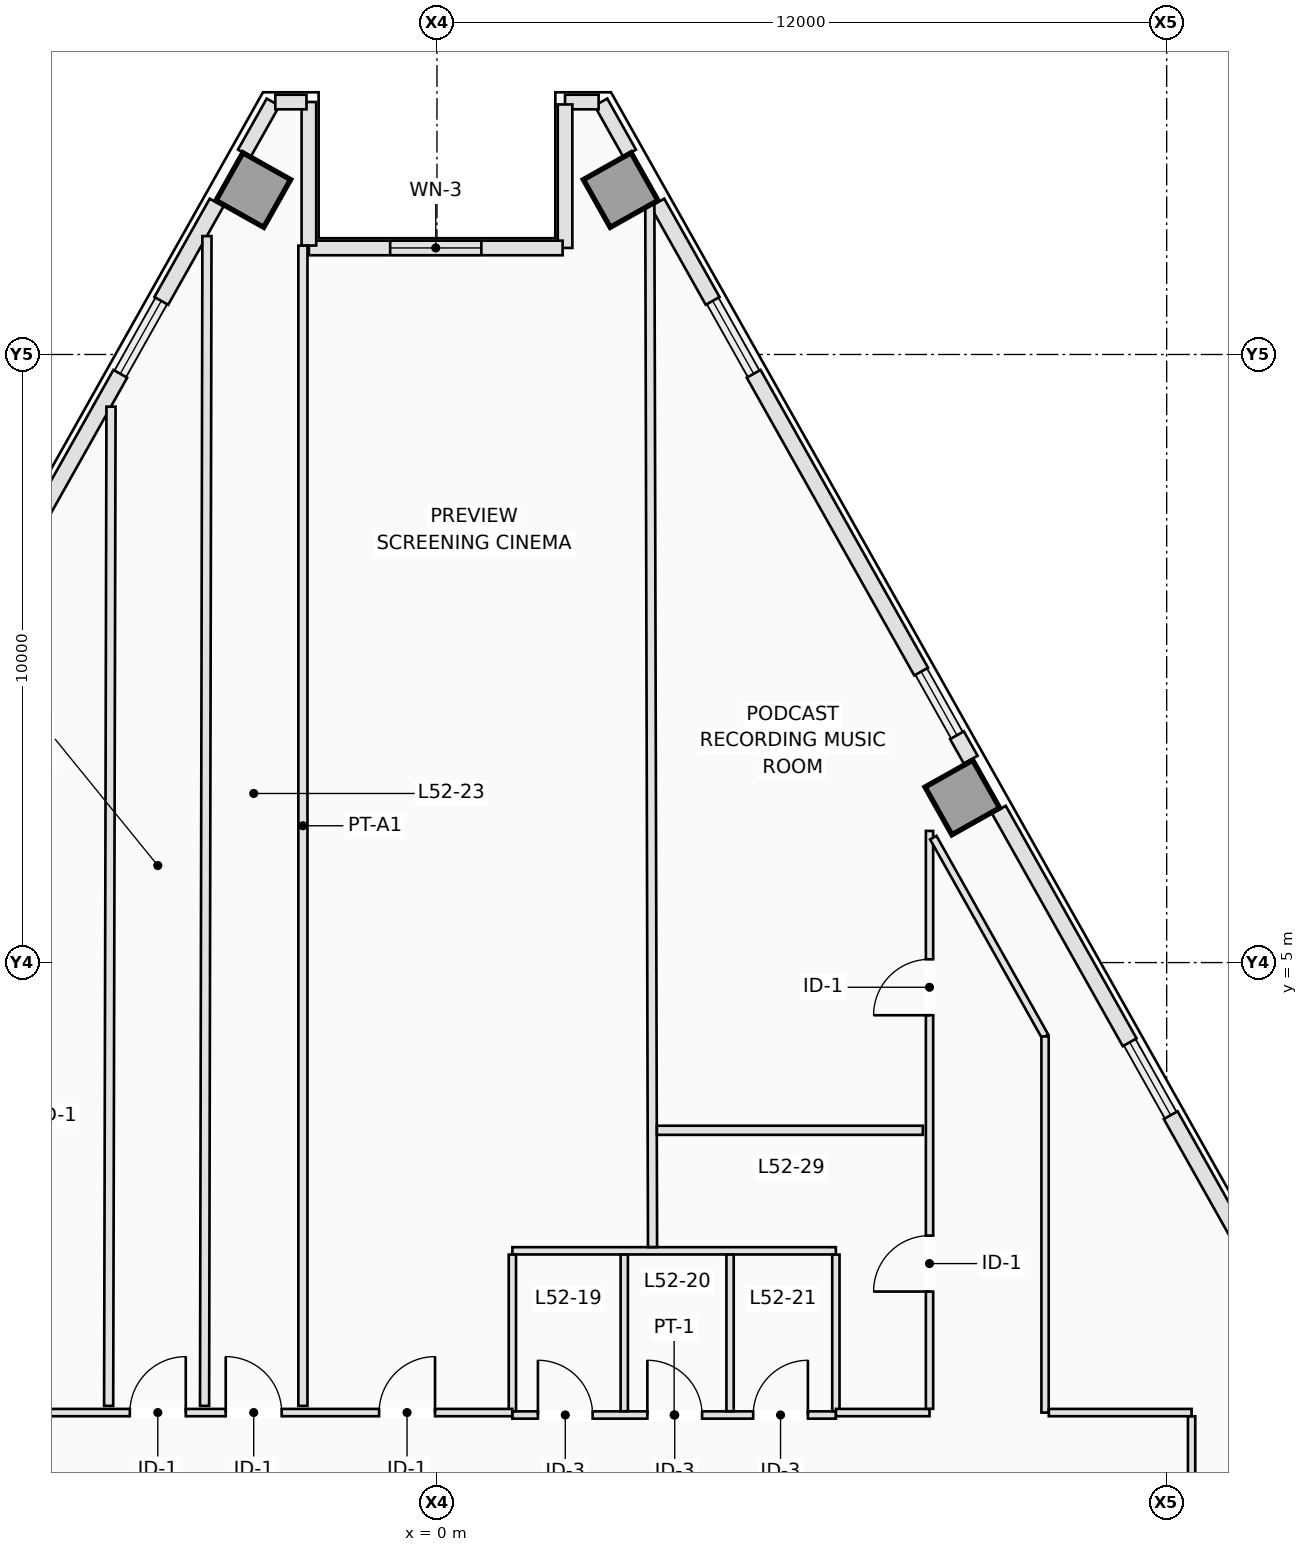
"""IFC4 building model, lengths in metres.
Left out: names, types, materials, properties, quantities, classifications, styles, units other than length and angle.
Written with IfcOpenShell. Run it as: python <this file> out.ifc"""

import sys

from ifc_helpers import new_model, si_unit, direction, frame, frame_2d, origin, origin_2d, place, context, subcontext, project, spatial, rectangle, extrude, element, fill, save


model = new_model("IFC4")
c1 = context("Model", 3, precision=1e-05, world=origin(), true_north=direction((0.0, 1.0)))
c2 = subcontext(c1, "Body", "Model", "MODEL_VIEW")
j1 = project(units=[si_unit("LENGTHUNIT", "METRE"), si_unit("PLANEANGLEUNIT", "RADIAN")], contexts=[c1])
p1 = place(None, origin())
s1 = spatial("IfcSite", under=j1, at=p1, CompositionType="ELEMENT")
p2 = place(p1, origin())
s2 = spatial("IfcBuilding", under=s1, at=p2, CompositionType="ELEMENT")
p3 = place(p2, frame((0.0, 0.0, 190.4)))
s3 = spatial("IfcBuildingStorey", under=s2, at=p3, CompositionType="ELEMENT", Elevation=190.4)
for number, where, z_axis, x_axis in (
    (1, (8.64, 7.715, 0.0), (0.0, 0.0, 1.0), (0.872, 0.49, 0.0)),
    (2, (3.021, 17.704, 0.0), (0.0, 0.0, 1.0), (0.872, 0.49, 0.0)),
    (3, (-3.021, 17.704, 0.0), (0.0, 0.0, 1.0), (-0.872, 0.49, 0.0)),
):
    element("IfcColumn", number, at=place(p3, frame(where, z_axis=z_axis, x_axis=x_axis)), inside=s3, PredefinedType="COLUMN", context=c2, shape_type="SweptSolid", body=[
        extrude(rectangle(XDim=0.9, YDim=0.9, at=origin_2d()), origin(), (0.0, 0.0, 1.0), 3.5),
    ])
p4 = place(p3, frame((2.695, 19.149, 0.0), z_axis=(0.0, 0.0, 1.0), x_axis=(0.490345412687, -0.87152818443, 0.0)))
e4 = element("IfcWall", 4, at=p4, inside=s3, PredefinedType="STANDARD", context=c2, shape_type="SweptSolid", body=[
    extrude(rectangle(XDim=0.964, YDim=0.24, at=frame_2d((0.482, 0.0))), origin(), (0.0, 0.0, 1.0), 3.25),
])
p5 = place(p3, frame((3.624, 17.499, 0.0), z_axis=(0.0, 0.0, 1.0), x_axis=(0.490261239633, -0.871575537125, 0.0)))
e5 = element("IfcWall", 5, at=p5, inside=s3, PredefinedType="STANDARD", context=c2, shape_type="SweptSolid", body=[
    extrude(rectangle(XDim=1.855, YDim=0.26, at=frame_2d((0.928, 0.0))), origin(), (0.0, 0.0, 1.0), 3.25),
])
p6 = place(p3, frame((5.208, 14.682, 0.0), z_axis=(0.0, 0.0, 1.0), x_axis=(0.490240608828, -0.871587141631, 0.0)))
e6 = element("IfcWall", 6, at=p6, inside=s3, PredefinedType="STANDARD", context=c2, shape_type="SweptSolid", body=[
    extrude(rectangle(XDim=5.618, YDim=0.26, at=frame_2d((2.809, 0.0))), origin(), (0.0, 0.0, 1.0), 3.25),
])
p7 = place(p3, frame((8.552, 8.738, 0.0), z_axis=(0.0, 0.0, 1.0), x_axis=(0.490412424957, -0.871490478116, 0.0)))
e7 = element("IfcWall", 7, at=p7, inside=s3, PredefinedType="STANDARD", context=c2, shape_type="SweptSolid", body=[
    extrude(rectangle(XDim=0.46, YDim=0.26, at=frame_2d((0.23, 0.0))), origin(), (0.0, 0.0, 1.0), 3.25),
])
p8 = place(p3, frame((9.24, 7.514, 0.0), z_axis=(0.0, 0.0, 1.0), x_axis=(0.490237464814, -0.871588910033, 0.0)))
e8 = element("IfcWall", 8, at=p8, inside=s3, PredefinedType="STANDARD", context=c2, shape_type="SweptSolid", body=[
    extrude(rectangle(XDim=4.388, YDim=0.26, at=frame_2d((2.194, 0.0))), origin(), (0.0, 0.0, 1.0), 3.25),
])
p9 = place(p3, frame((12.066, 2.49, 0.0), z_axis=(0.0, 0.0, 1.0), x_axis=(0.490261239633, -0.871575537125, 0.0)))
e9 = element("IfcWall", 9, at=p9, inside=s3, PredefinedType="STANDARD", context=c2, shape_type="SweptSolid", body=[
    extrude(rectangle(XDim=4.388, YDim=0.26, at=frame_2d((2.194, 0.0))), origin(), (0.0, 0.0, 1.0), 3.25),
])
p10 = place(p3, frame((-3.168, 18.309, 0.0), z_axis=(0.0, 0.0, 1.0), x_axis=(0.490345412687, 0.87152818443, 0.0)))
e10 = element("IfcWall", 10, at=p10, inside=s3, PredefinedType="STANDARD", context=c2, shape_type="SweptSolid", body=[
    extrude(rectangle(XDim=0.964, YDim=0.24, at=frame_2d((0.482, 0.0))), origin(), (0.0, 0.0, 1.0), 3.25),
])
p11 = place(p3, frame((-7.962, 9.785, 0.0), z_axis=(0.0, 0.0, 1.0), x_axis=(0.490240608828, 0.871587141631, 0.0)))
e11 = element("IfcWall", 11, at=p11, inside=s3, PredefinedType="STANDARD", context=c2, shape_type="SweptSolid", body=[
    extrude(rectangle(XDim=5.618, YDim=0.26, at=frame_2d((2.809, 0.0))), origin(), (0.0, 0.0, 1.0), 3.25),
])
p12 = place(p3, frame((-4.533, 15.882, 0.0), z_axis=(0.0, 0.0, 1.0), x_axis=(0.490261239633, 0.871575537125, 0.0)))
e12 = element("IfcWall", 12, at=p12, inside=s3, PredefinedType="STANDARD", context=c2, shape_type="SweptSolid", body=[
    extrude(rectangle(XDim=1.855, YDim=0.26, at=frame_2d((0.928, 0.0))), origin(), (0.0, 0.0, 1.0), 3.25),
])
p13 = place(p3, frame((2.658, 19.152, 0.0), z_axis=(0.0, 0.0, 1.0), x_axis=(-1.0, 0.0, 0.0)))
e13 = element("IfcWall", 13, at=p13, inside=s3, PredefinedType="STANDARD", context=c2, shape_type="SweptSolid", body=[
    extrude(rectangle(XDim=0.552, YDim=0.24, at=frame_2d((0.276, 0.0))), origin(), (0.0, 0.0, 1.0), 3.25),
])
p14 = place(p3, frame((2.106, 19.112, 0.0), z_axis=(0.0, 0.0, 1.0), x_axis=(0.0, -1.0, 0.0)))
e14 = element("IfcWall", 14, at=p14, inside=s3, PredefinedType="STANDARD", context=c2, shape_type="SweptSolid", body=[
    extrude(rectangle(XDim=2.36, YDim=0.24, at=frame_2d((1.18, 0.0))), origin(), (0.0, 0.0, 1.0), 3.25),
])
p15 = place(p3, frame((2.066, 16.752, 0.0), z_axis=(0.0, 0.0, 1.0), x_axis=(-1.0, 0.0, 0.0)))
e15 = element("IfcWall", 15, at=p15, inside=s3, PredefinedType="STANDARD", context=c2, shape_type="SweptSolid", body=[
    extrude(rectangle(XDim=4.172, YDim=0.24, at=frame_2d((2.086, 0.0))), origin(), (0.0, 0.0, 1.0), 3.25),
])
p16 = place(p15, frame((1.336, 0.0, 0.9)))
e16 = element("IfcOpeningElement", 16, at=p16, cuts=e15, PredefinedType="OPENING", context=c2, shape_type="SweptSolid", body=[
    extrude(rectangle(XDim=1.5, YDim=1.95, at=frame_2d((0.75, 0.975))), frame((0.0, 0.13, 0.0), z_axis=(0.0, -1.0, 0.0), x_axis=(1.0, 0.0, 0.0)), (0.0, 0.0, 1.0), 0.26),
])
p17 = place(p3, frame((-2.106, 16.792, 0.0), z_axis=(0.0, 0.0, 1.0), x_axis=(0.0, 1.0, 0.0)))
e17 = element("IfcWall", 17, at=p17, inside=s3, PredefinedType="STANDARD", context=c2, shape_type="SweptSolid", body=[
    extrude(rectangle(XDim=2.36, YDim=0.24, at=frame_2d((1.18, 0.0))), origin(), (0.0, 0.0, 1.0), 3.25),
])
p18 = place(p3, frame((-2.146, 19.152, 0.0), z_axis=(0.0, 0.0, 1.0), x_axis=(-1.0, 0.0, 0.0)))
e18 = element("IfcWall", 18, at=p18, inside=s3, PredefinedType="STANDARD", context=c2, shape_type="SweptSolid", body=[
    extrude(rectangle(XDim=0.512, YDim=0.24, at=frame_2d((0.256, 0.0))), origin(), (0.0, 0.0, 1.0), 3.25),
])
p19 = place(p3, frame((1.24, -2.44, 0.0), z_axis=(0.0, 0.0, 1.0), x_axis=(1.0, 0.0, 0.0)))
e19 = element("IfcWall", 19, at=p19, inside=s3, PredefinedType="PARTITIONING", context=c2, shape_type="SweptSolid", body=[
    extrude(rectangle(XDim=5.32, YDim=0.12, at=frame_2d((2.66, 0.0))), origin(), (0.0, 0.0, 1.0), 2.943),
])
p20 = place(p19, frame((0.42, 0.0, 0.0)))
e20 = element("IfcOpeningElement", 20, at=p20, cuts=e19, PredefinedType="OPENING", context=c2, shape_type="SweptSolid", body=[
    extrude(rectangle(XDim=0.9, YDim=2.12, at=frame_2d((0.45, 1.06))), frame((0.0, 0.07, 0.0), z_axis=(0.0, -1.0, 0.0), x_axis=(1.0, 0.0, 0.0)), (0.0, 0.0, 1.0), 0.14),
])
p21 = place(p19, frame((2.22, 0.0, 0.0)))
e21 = element("IfcOpeningElement", 21, at=p21, cuts=e19, PredefinedType="OPENING", context=c2, shape_type="SweptSolid", body=[
    extrude(rectangle(XDim=0.9, YDim=2.12, at=frame_2d((0.45, 1.06))), frame((0.0, 0.07, 0.0), z_axis=(0.0, -1.0, 0.0), x_axis=(1.0, 0.0, 0.0)), (0.0, 0.0, 1.0), 0.14),
])
p22 = place(p19, frame((3.96, 0.0, 0.0)))
e22 = element("IfcOpeningElement", 22, at=p22, cuts=e19, PredefinedType="OPENING", context=c2, shape_type="SweptSolid", body=[
    extrude(rectangle(XDim=0.9, YDim=2.12, at=frame_2d((0.45, 1.06))), frame((0.0, 0.07, 0.0), z_axis=(0.0, -1.0, 0.0), x_axis=(1.0, 0.0, 0.0)), (0.0, 0.0, 1.0), 0.14),
])
p23 = place(p3, frame((1.24, 0.26, 0.0), z_axis=(0.0, 0.0, 1.0), x_axis=(1.0, 0.0, 0.0)))
e23 = element("IfcWall", 23, at=p23, inside=s3, PredefinedType="PARTITIONING", context=c2, shape_type="SweptSolid", body=[
    extrude(rectangle(XDim=5.32, YDim=0.12, at=frame_2d((2.66, 0.0))), origin(), (0.0, 0.0, 1.0), 3.25),
])
for number, where, z_axis, x_axis in (
    (24, (1.24, -2.378, 0.0), (0.0, 0.0, 1.0), (0.0, 1.0, 0.0)),
    (25, (3.08, -2.378, 0.0), (0.0, 0.0, 1.0), (0.0, 1.0, 0.0)),
    (26, (4.82, -2.378, 0.0), (0.0, 0.0, 1.0), (0.0, 1.0, 0.0)),
    (27, (6.56, -2.378, 0.0), (0.0, 0.0, 1.0), (0.0, 1.0, 0.0)),
):
    element("IfcWall", number, at=place(p3, frame(where, z_axis=z_axis, x_axis=x_axis)), inside=s3, PredefinedType="PARTITIONING", context=c2, shape_type="SweptSolid", body=[
        extrude(rectangle(XDim=2.576, YDim=0.12, at=frame_2d((1.288, 0.0))), origin(), (0.0, 0.0, 1.0), 3.25),
    ])
p24 = place(p3, frame((-7.938, -2.4, 0.0), z_axis=(0.0, 0.0, 1.0), x_axis=(1.0, 0.0, 0.0)))
e28 = element("IfcWall", 28, at=p24, inside=s3, PredefinedType="PARTITIONING", context=c2, shape_type="SweptSolid", body=[
    extrude(rectangle(XDim=9.176, YDim=0.12, at=frame_2d((4.588, 0.0))), origin(), (0.0, 0.0, 1.0), 2.943),
])
p25 = place(p24, frame((4.464, 0.0, 0.0)))
e29 = element("IfcOpeningElement", 29, at=p25, cuts=e28, PredefinedType="OPENING", context=c2, shape_type="SweptSolid", body=[
    extrude(rectangle(XDim=0.92, YDim=2.12, at=frame_2d((0.46, 1.06))), frame((0.0, 0.07, 0.0), z_axis=(0.0, -1.0, 0.0), x_axis=(1.0, 0.0, 0.0)), (0.0, 0.0, 1.0), 0.14),
])
p26 = place(p24, frame((6.986, 0.0, 0.0)))
e30 = element("IfcOpeningElement", 30, at=p26, cuts=e28, PredefinedType="OPENING", context=c2, shape_type="SweptSolid", body=[
    extrude(rectangle(XDim=0.92, YDim=2.12, at=frame_2d((0.46, 1.06))), frame((0.0, 0.07, 0.0), z_axis=(0.0, -1.0, 0.0), x_axis=(1.0, 0.0, 0.0)), (0.0, 0.0, 1.0), 0.14),
])
p27 = place(p24, frame((2.887, 0.0, 0.0)))
e31 = element("IfcOpeningElement", 31, at=p27, cuts=e28, PredefinedType="OPENING", context=c2, shape_type="SweptSolid", body=[
    extrude(rectangle(XDim=0.92, YDim=2.12, at=frame_2d((0.46, 1.06))), frame((0.0, 0.07, 0.0), z_axis=(0.0, -1.0, 0.0), x_axis=(1.0, 0.0, 0.0)), (0.0, 0.0, 1.0), 0.14),
])
p28 = place(p3, frame((6.562, -2.4, 0.0), z_axis=(0.0, 0.0, 1.0), x_axis=(1.0, 0.0, 0.0)))
e32 = element("IfcWall", 32, at=p28, inside=s3, PredefinedType="PARTITIONING", context=c2, shape_type="SweptSolid", body=[
    extrude(rectangle(XDim=1.538, YDim=0.12, at=frame_2d((0.769, 0.0))), origin(), (0.0, 0.0, 1.0), 3.25),
])
p29 = place(p3, frame((8.1, -2.338, 0.0), z_axis=(0.0, 0.0, 1.0), x_axis=(0.0, 1.0, 0.0)))
e33 = element("IfcWall", 33, at=p29, inside=s3, PredefinedType="PARTITIONING", context=c2, shape_type="SweptSolid", body=[
    extrude(rectangle(XDim=9.503, YDim=0.12, at=frame_2d((4.751, 0.0))), origin(), (0.0, 0.0, 1.0), 3.25),
])
p30 = place(p29, frame((6.472, 0.0, 0.0)))
e34 = element("IfcOpeningElement", 34, at=p30, cuts=e33, PredefinedType="OPENING", context=c2, shape_type="SweptSolid", body=[
    extrude(rectangle(XDim=0.92, YDim=2.12, at=frame_2d((0.46, 1.06))), frame((0.0, 0.07, 0.0), z_axis=(0.0, -1.0, 0.0), x_axis=(1.0, 0.0, 0.0)), (0.0, 0.0, 1.0), 0.14),
])
p31 = place(p29, frame((1.928, 0.0, 0.0)))
e35 = element("IfcOpeningElement", 35, at=p31, cuts=e33, PredefinedType="OPENING", context=c2, shape_type="SweptSolid", body=[
    extrude(rectangle(XDim=0.92, YDim=2.12, at=frame_2d((0.46, 1.06))), frame((0.0, 0.07, 0.0), z_axis=(0.0, -1.0, 0.0), x_axis=(1.0, 0.0, 0.0)), (0.0, 0.0, 1.0), 0.14),
])
p32 = place(p3, frame((8.162, 7.055, 0.0), z_axis=(0.0, 0.0, 1.0), x_axis=(0.490236504766, -0.871589450025, 0.0)))
e36 = element("IfcWall", 36, at=p32, inside=s3, PredefinedType="PARTITIONING", context=c2, shape_type="SweptSolid", body=[
    extrude(rectangle(XDim=3.749, YDim=0.12, at=frame_2d((1.875, 0.0))), origin(), (0.0, 0.0, 1.0), 3.25),
])
p33 = place(p3, frame((10.0, 3.785, 0.0), z_axis=(0.0, 0.0, 1.0), x_axis=(0.0, -1.0, 0.0)))
e37 = element("IfcWall", 37, at=p33, inside=s3, PredefinedType="PARTITIONING", context=c2, shape_type="SweptSolid", body=[
    extrude(rectangle(XDim=6.185, YDim=0.12, at=frame_2d((3.092, 0.0))), origin(), (0.0, 0.0, 1.0), 3.25),
])
p34 = place(p3, frame((10.062, -2.4, 0.0), z_axis=(0.0, 0.0, 1.0), x_axis=(1.0, 0.0, 0.0)))
e38 = element("IfcWall", 38, at=p34, inside=s3, PredefinedType="PARTITIONING", context=c2, shape_type="SweptSolid", body=[
    extrude(rectangle(XDim=2.348, YDim=0.12, at=frame_2d((1.174, 0.0))), origin(), (0.0, 0.0, 1.0), 3.25),
])
p35 = place(p3, frame((12.41, -2.462, 0.0), z_axis=(0.0, 0.0, 1.0), x_axis=(0.0, -1.0, 0.0)))
e39 = element("IfcWall", 39, at=p35, inside=s3, PredefinedType="PARTITIONING", context=c2, shape_type="SweptSolid", body=[
    extrude(rectangle(XDim=2.611, YDim=0.12, at=frame_2d((1.306, 0.0))), origin(), (0.0, 0.0, 1.0), 3.25),
])
p36 = place(p3, frame((-2.205, 16.79, 0.0), z_axis=(0.0, 0.0, 1.0), x_axis=(0.0, -1.0, 0.0)))
e40 = element("IfcWall", 40, at=p36, inside=s3, PredefinedType="PARTITIONING", context=c2, shape_type="SweptSolid", body=[
    extrude(rectangle(XDim=19.08, YDim=0.15, at=frame_2d((9.54, 0.0))), origin(), (0.0, 0.0, 1.0), 3.25),
])
p37 = place(p3, frame((-3.822, -2.29, 0.0), z_axis=(0.0, 0.0, 1.0), x_axis=(0.002043298524, 0.999997912463, 0.0)))
e41 = element("IfcWall", 41, at=p37, inside=s3, PredefinedType="PARTITIONING", context=c2, shape_type="SweptSolid", body=[
    extrude(rectangle(XDim=19.237, YDim=0.15, at=frame_2d((9.618, 0.0))), origin(), (0.0, 0.0, 1.0), 2.722),
])
p38 = place(p3, frame((3.5, 17.456, 0.0), z_axis=(0.0, 0.0, 1.0), x_axis=(0.002593322713, -0.999996637333, 0.0)))
e42 = element("IfcWall", 42, at=p38, inside=s3, PredefinedType="PARTITIONING", context=c2, shape_type="SweptSolid", body=[
    extrude(rectangle(XDim=17.134, YDim=0.15, at=frame_2d((8.567, 0.0))), origin(), (0.0, 0.0, 1.0), 2.722),
])
p39 = place(p3, frame((7.99, 2.242, 0.0), z_axis=(0.0, 0.0, 1.0), x_axis=(-1.0, 0.0, 0.0)))
e43 = element("IfcWall", 43, at=p39, inside=s3, PredefinedType="PARTITIONING", context=c2, shape_type="SweptSolid", body=[
    extrude(rectangle(XDim=4.373, YDim=0.15, at=frame_2d((2.187, 0.0))), origin(), (0.0, 0.0, 1.0), 3.25),
])
p40 = place(p3, frame((-5.4, -2.29, 0.0), z_axis=(0.0, 0.0, 1.0), x_axis=(0.00237719591, 0.999997174466, 0.0)))
e44 = element("IfcWall", 44, at=p40, inside=s3, PredefinedType="PARTITIONING", context=c2, shape_type="SweptSolid", body=[
    extrude(rectangle(XDim=16.432, YDim=0.15, at=frame_2d((8.216, 0.0))), origin(), (0.0, 0.0, 1.0), 3.25),
])
p41 = place(p16, origin())
e45 = element("IfcWindow", 45, at=p41, inside=s3, PartitioningType="SINGLE_PANEL", PredefinedType="WINDOW", context=c2, shape_type="SweptSolid", body=[
    extrude(rectangle(XDim=1.5, YDim=1.95, at=frame_2d((0.75, 0.975))), frame((0.0, 0.03, 0.0), z_axis=(0.0, -1.0, 0.0), x_axis=(1.0, 0.0, 0.0)), (0.0, 0.0, 1.0), 0.06),
])
fill(e16, e45)
p42 = place(p20, origin())
e46 = element("IfcDoor", 46, at=p42, inside=s3, OperationType="SINGLE_SWING_LEFT", PredefinedType="DOOR", context=c2, shape_type="SweptSolid", body=[
    extrude(rectangle(XDim=0.9, YDim=2.12, at=frame_2d((0.45, 1.06))), frame((0.0, 0.025, 0.0), z_axis=(0.0, -1.0, 0.0), x_axis=(1.0, 0.0, 0.0)), (0.0, 0.0, 1.0), 0.05),
])
fill(e20, e46)
p43 = place(p21, origin())
e47 = element("IfcDoor", 47, at=p43, inside=s3, OperationType="SINGLE_SWING_LEFT", PredefinedType="DOOR", context=c2, shape_type="SweptSolid", body=[
    extrude(rectangle(XDim=0.9, YDim=2.12, at=frame_2d((0.45, 1.06))), frame((0.0, 0.025, 0.0), z_axis=(0.0, -1.0, 0.0), x_axis=(1.0, 0.0, 0.0)), (0.0, 0.0, 1.0), 0.05),
])
fill(e21, e47)
p44 = place(p22, origin())
e48 = element("IfcDoor", 48, at=p44, inside=s3, OperationType="SINGLE_SWING_RIGHT", PredefinedType="DOOR", context=c2, shape_type="SweptSolid", body=[
    extrude(rectangle(XDim=0.9, YDim=2.12, at=frame_2d((0.45, 1.06))), frame((0.0, 0.025, 0.0), z_axis=(0.0, -1.0, 0.0), x_axis=(1.0, 0.0, 0.0)), (0.0, 0.0, 1.0), 0.05),
])
fill(e22, e48)
p45 = place(p25, origin())
e49 = element("IfcDoor", 49, at=p45, inside=s3, OperationType="SINGLE_SWING_LEFT", PredefinedType="DOOR", context=c2, shape_type="SweptSolid", body=[
    extrude(rectangle(XDim=0.92, YDim=2.12, at=frame_2d((0.46, 1.06))), frame((0.0, 0.025, 0.0), z_axis=(0.0, -1.0, 0.0), x_axis=(1.0, 0.0, 0.0)), (0.0, 0.0, 1.0), 0.05),
])
fill(e29, e49)
p46 = place(p26, origin())
e50 = element("IfcDoor", 50, at=p46, inside=s3, OperationType="SINGLE_SWING_RIGHT", PredefinedType="DOOR", context=c2, shape_type="SweptSolid", body=[
    extrude(rectangle(XDim=0.92, YDim=2.12, at=frame_2d((0.46, 1.06))), frame((0.0, 0.025, 0.0), z_axis=(0.0, -1.0, 0.0), x_axis=(1.0, 0.0, 0.0)), (0.0, 0.0, 1.0), 0.05),
])
fill(e30, e50)
p47 = place(p30, origin())
e51 = element("IfcDoor", 51, at=p47, inside=s3, OperationType="SINGLE_SWING_LEFT", PredefinedType="DOOR", context=c2, shape_type="SweptSolid", body=[
    extrude(rectangle(XDim=0.92, YDim=2.12, at=frame_2d((0.46, 1.06))), frame((0.0, 0.025, 0.0), z_axis=(0.0, -1.0, 0.0), x_axis=(1.0, 0.0, 0.0)), (0.0, 0.0, 1.0), 0.05),
])
fill(e34, e51)
p48 = place(p27, origin())
e52 = element("IfcDoor", 52, at=p48, inside=s3, OperationType="SINGLE_SWING_RIGHT", PredefinedType="DOOR", context=c2, shape_type="SweptSolid", body=[
    extrude(rectangle(XDim=0.92, YDim=2.12, at=frame_2d((0.46, 1.06))), frame((0.0, 0.025, 0.0), z_axis=(0.0, -1.0, 0.0), x_axis=(1.0, 0.0, 0.0)), (0.0, 0.0, 1.0), 0.05),
])
fill(e31, e52)
p49 = place(p31, origin())
e53 = element("IfcDoor", 53, at=p49, inside=s3, OperationType="SINGLE_SWING_LEFT", PredefinedType="DOOR", context=c2, shape_type="SweptSolid", body=[
    extrude(rectangle(XDim=0.92, YDim=2.12, at=frame_2d((0.46, 1.06))), frame((0.0, 0.025, 0.0), z_axis=(0.0, -1.0, 0.0), x_axis=(1.0, 0.0, 0.0)), (0.0, 0.0, 1.0), 0.05),
])
fill(e35, e53)
save(model, sys.argv[1])
